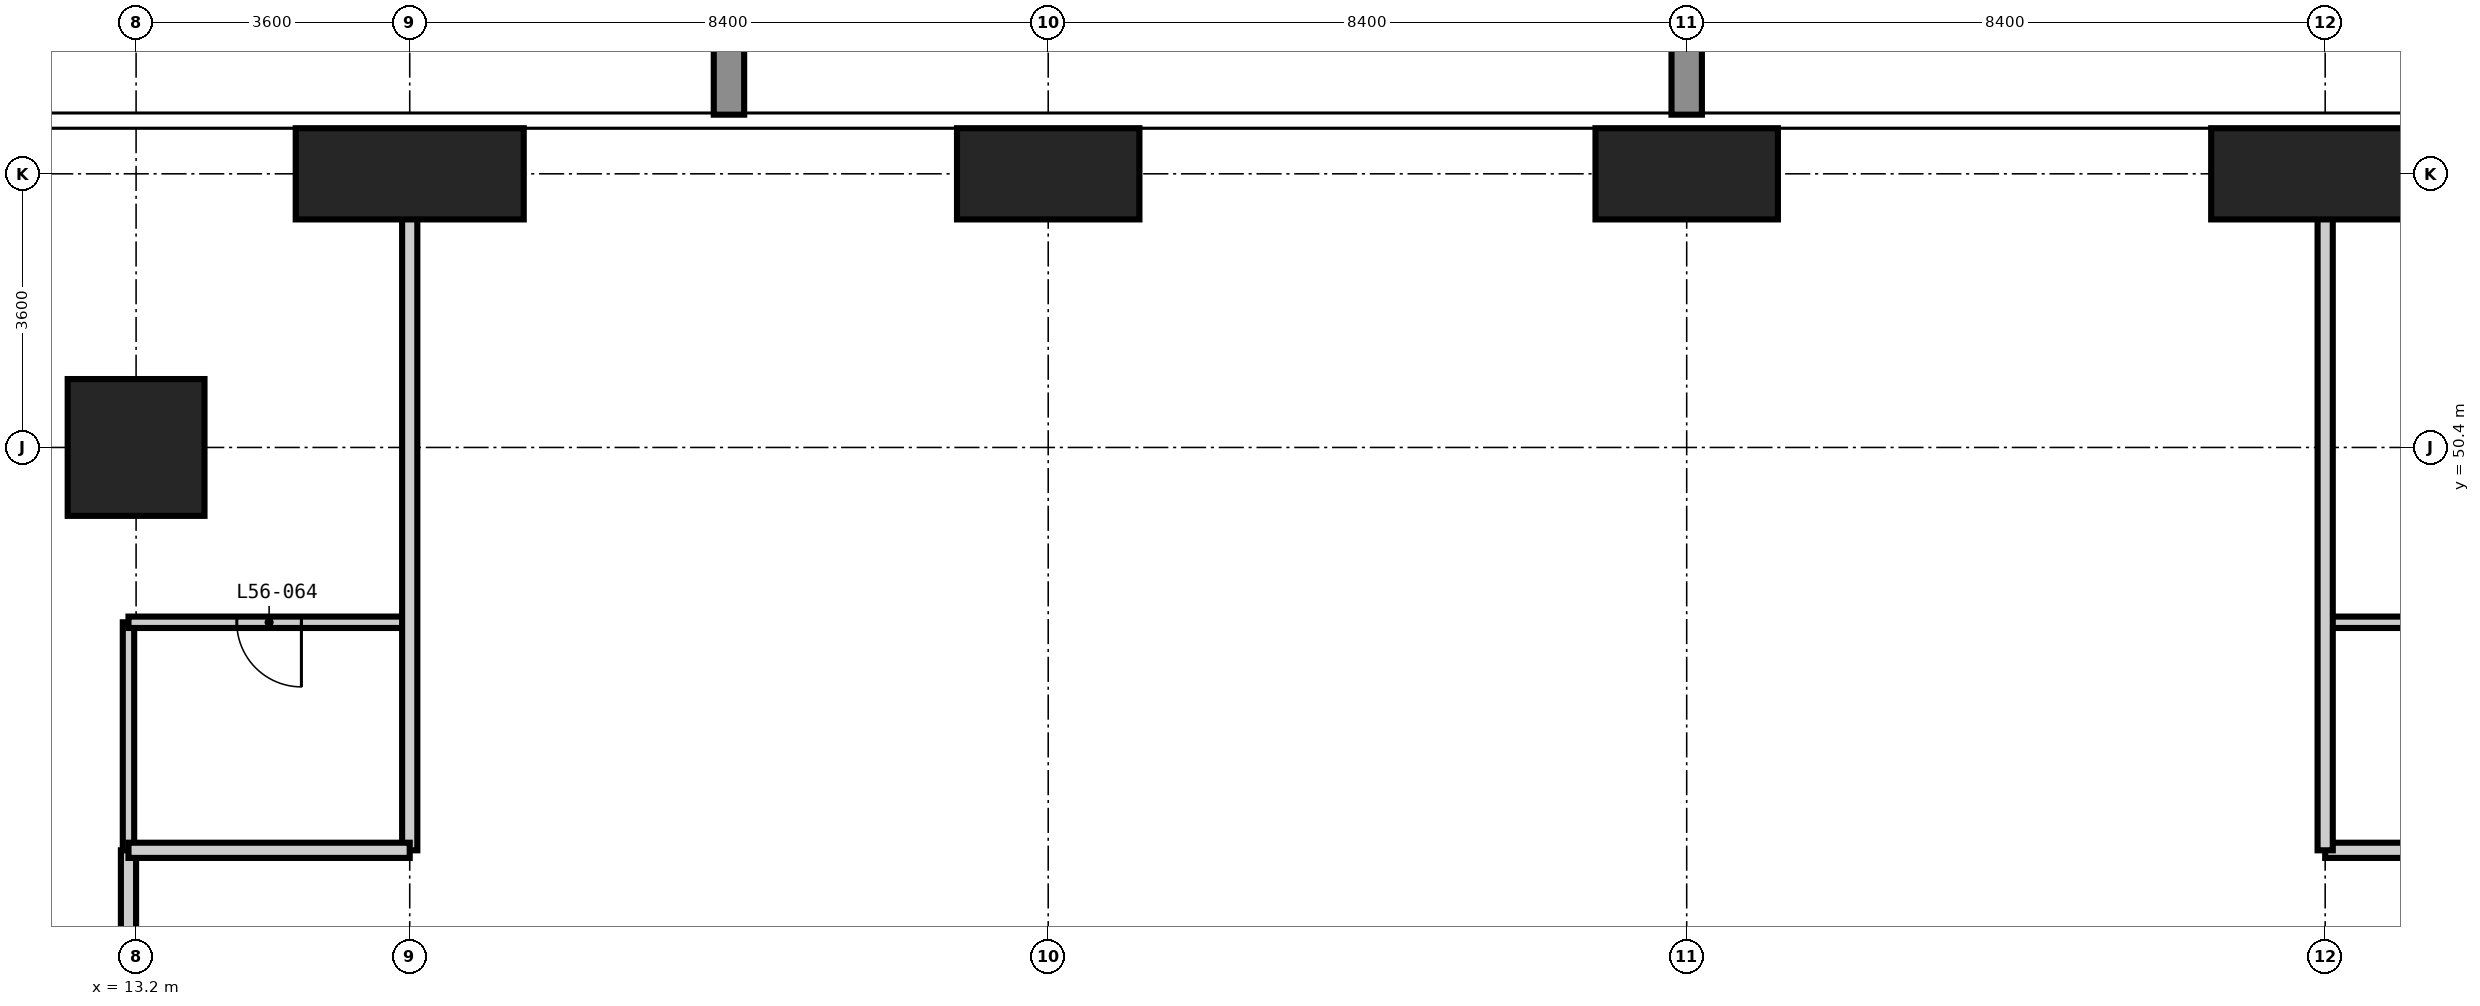
"""IFC4 building model, lengths in metres.
Left out: names, types, materials, properties, quantities, classifications, styles, units other than length and angle.
Written with IfcOpenShell. Run it as: python <this file> out.ifc"""

import sys

from ifc_helpers import new_model, si_unit, direction, frame, frame_2d, origin, origin_2d, place, context, subcontext, project, spatial, rectangle, extrude, element, fill, save


model = new_model("IFC4")
c1 = context("Model", 3, precision=1e-05, world=origin(), true_north=direction((0.0, 1.0)))
c2 = subcontext(c1, "Body", "Model", "MODEL_VIEW")
j1 = project(units=[si_unit("LENGTHUNIT", "METRE"), si_unit("PLANEANGLEUNIT", "RADIAN")], contexts=[c1])
p1 = place(None, origin())
s1 = spatial("IfcSite", under=j1, at=p1, CompositionType="ELEMENT")
p2 = place(p1, origin())
s2 = spatial("IfcBuilding", under=s1, at=p2, CompositionType="ELEMENT")
p3 = place(p2, frame((0.0, 0.0, 216.6)))
s3 = spatial("IfcBuildingStorey", under=s2, at=p3, CompositionType="ELEMENT", Elevation=216.6)
p4 = place(p3, frame((13.2, 50.4, -0.35), z_axis=(0.0, 0.0, 1.0), x_axis=(1.0, 0.0, 0.0)))
e1 = element("IfcColumn", 1, at=p4, inside=s3, PredefinedType="COLUMN", context=c2, shape_type="SweptSolid", body=[
    extrude(rectangle(XDim=1.8, YDim=1.8, at=origin_2d()), origin(), (0.0, 0.0, 1.0), 3.55),
])
p5 = place(p3, frame((16.8, 54.0, -0.35), z_axis=(0.0, 0.0, 1.0), x_axis=(1.0, 0.0, 0.0)))
e2 = element("IfcColumn", 2, at=p5, inside=s3, PredefinedType="COLUMN", context=c2, shape_type="SweptSolid", body=[
    extrude(rectangle(XDim=3.0, YDim=1.2, at=origin_2d()), origin(), (0.0, 0.0, 1.0), 3.55),
])
for number, where, z_axis, x_axis in (
    (3, (25.2, 54.0, -0.35), (0.0, 0.0, 1.0), (1.0, 0.0, 0.0)),
    (4, (33.6, 54.0, -0.35), (0.0, 0.0, 1.0), (1.0, 0.0, 0.0)),
):
    element("IfcColumn", number, at=place(p3, frame(where, z_axis=z_axis, x_axis=x_axis)), inside=s3, PredefinedType="COLUMN", context=c2, shape_type="SweptSolid", body=[
        extrude(rectangle(XDim=2.4, YDim=1.2, at=origin_2d()), origin(), (0.0, 0.0, 1.0), 3.55),
    ])
p6 = place(p3, frame((42.0, 54.0, -0.35), z_axis=(0.0, 0.0, 1.0), x_axis=(1.0, 0.0, 0.0)))
e5 = element("IfcColumn", 5, at=p6, inside=s3, PredefinedType="COLUMN", context=c2, shape_type="SweptSolid", body=[
    extrude(rectangle(XDim=3.0, YDim=1.2, at=origin_2d()), origin(), (0.0, 0.0, 1.0), 3.55),
])
p7 = place(p3, frame((13.1, 45.1, 0.0), z_axis=(0.0, 0.0, 1.0), x_axis=(0.0, 1.0, 0.0)))
e6 = element("IfcWall", 6, at=p7, inside=s3, PredefinedType="PARTITIONING", context=c2, shape_type="SweptSolid", body=[
    extrude(rectangle(XDim=3.0, YDim=0.15, at=frame_2d((1.5, 0.0))), origin(), (0.0, 0.0, 1.0), 3.2),
])
p8 = place(p3, frame((13.1, 48.1, 0.0), z_axis=(0.0, 0.0, 1.0), x_axis=(1.0, 0.0, 0.0)))
e7 = element("IfcWall", 7, at=p8, inside=s3, PredefinedType="PARTITIONING", context=c2, shape_type="SweptSolid", body=[
    extrude(rectangle(XDim=3.7, YDim=0.15, at=frame_2d((1.85, 0.0))), origin(), (0.0, 0.0, 1.0), 3.2),
])
p9 = place(p8, frame((1.425, 0.0, 0.0)))
e8 = element("IfcOpeningElement", 8, at=p9, cuts=e7, PredefinedType="OPENING", context=c2, shape_type="SweptSolid", body=[
    extrude(rectangle(XDim=0.85, YDim=2.1, at=frame_2d((0.425, 1.05))), frame((0.0, 0.085, 0.0), z_axis=(0.0, -1.0, 0.0), x_axis=(1.0, 0.0, 0.0)), (0.0, 0.0, 1.0), 0.17),
])
p10 = place(p3, frame((42.0, 48.1, 0.0), z_axis=(0.0, 0.0, 1.0), x_axis=(1.0, 0.0, 0.0)))
e9 = element("IfcWall", 9, at=p10, inside=s3, PredefinedType="PARTITIONING", context=c2, shape_type="SweptSolid", body=[
    extrude(rectangle(XDim=2.5, YDim=0.15, at=frame_2d((1.25, 0.0))), origin(), (0.0, 0.0, 1.0), 3.2),
])
p11 = place(p3, frame((13.1, 13.1, 0.0), z_axis=(0.0, 0.0, 1.0), x_axis=(0.0, 1.0, 0.0)))
e10 = element("IfcWall", 10, at=p11, inside=s3, PredefinedType="PARTITIONING", context=c2, shape_type="SweptSolid", body=[
    extrude(rectangle(XDim=32.0, YDim=0.2, at=frame_2d((16.0, 0.0))), origin(), (0.0, 0.0, 1.0), 3.2),
])
p12 = place(p11, frame((5.3, 0.0, 0.0)))
e11 = element("IfcOpeningElement", 11, at=p12, cuts=e10, PredefinedType="OPENING", context=c2, shape_type="SweptSolid", body=[
    extrude(rectangle(XDim=1.0, YDim=2.2, at=frame_2d((0.5, 1.1))), frame((0.0, 0.11, 0.0), z_axis=(0.0, -1.0, 0.0), x_axis=(1.0, 0.0, 0.0)), (0.0, 0.0, 1.0), 0.22),
])
p13 = place(p11, frame((13.1, 0.0, 0.0)))
e12 = element("IfcOpeningElement", 12, at=p13, cuts=e10, PredefinedType="OPENING", context=c2, shape_type="SweptSolid", body=[
    extrude(rectangle(XDim=1.0, YDim=2.2, at=frame_2d((0.5, 1.1))), frame((0.0, 0.11, 0.0), z_axis=(0.0, -1.0, 0.0), x_axis=(1.0, 0.0, 0.0)), (0.0, 0.0, 1.0), 0.22),
])
p14 = place(p11, frame((18.5, 0.0, 0.0)))
e13 = element("IfcOpeningElement", 13, at=p14, cuts=e10, PredefinedType="OPENING", context=c2, shape_type="SweptSolid", body=[
    extrude(rectangle(XDim=1.0, YDim=2.2, at=frame_2d((0.5, 1.1))), frame((0.0, 0.11, 0.0), z_axis=(0.0, -1.0, 0.0), x_axis=(1.0, 0.0, 0.0)), (0.0, 0.0, 1.0), 0.22),
])
p15 = place(p11, frame((26.3, 0.0, 0.0)))
e14 = element("IfcOpeningElement", 14, at=p15, cuts=e10, PredefinedType="OPENING", context=c2, shape_type="SweptSolid", body=[
    extrude(rectangle(XDim=1.0, YDim=2.2, at=frame_2d((0.5, 1.1))), frame((0.0, 0.11, 0.0), z_axis=(0.0, -1.0, 0.0), x_axis=(1.0, 0.0, 0.0)), (0.0, 0.0, 1.0), 0.22),
])
p16 = place(p11, frame((1.35, 0.0, 0.0)))
e15 = element("IfcOpeningElement", 15, at=p16, cuts=e10, PredefinedType="OPENING", context=c2, shape_type="SweptSolid", body=[
    extrude(rectangle(XDim=1.0, YDim=2.2, at=frame_2d((0.5, 1.1))), frame((0.0, 0.11, 0.0), z_axis=(0.0, -1.0, 0.0), x_axis=(1.0, 0.0, 0.0)), (0.0, 0.0, 1.0), 0.22),
])
p17 = place(p11, frame((29.95, 0.0, 0.0)))
e16 = element("IfcOpeningElement", 16, at=p17, cuts=e10, PredefinedType="OPENING", context=c2, shape_type="SweptSolid", body=[
    extrude(rectangle(XDim=1.0, YDim=2.2, at=frame_2d((0.5, 1.1))), frame((0.0, 0.11, 0.0), z_axis=(0.0, -1.0, 0.0), x_axis=(1.0, 0.0, 0.0)), (0.0, 0.0, 1.0), 0.22),
])
p18 = place(p3, frame((16.8, 45.1, 0.0), z_axis=(0.0, 0.0, 1.0), x_axis=(0.0, 1.0, 0.0)))
e17 = element("IfcWall", 17, at=p18, inside=s3, PredefinedType="PARTITIONING", context=c2, shape_type="SweptSolid", body=[
    extrude(rectangle(XDim=9.518, YDim=0.2, at=frame_2d((4.759, 0.0))), origin(), (0.0, 0.0, 1.0), 3.2),
])
p19 = place(p3, frame((13.1, 45.1, 0.0), z_axis=(0.0, 0.0, 1.0), x_axis=(1.0, 0.0, 0.0)))
e18 = element("IfcWall", 18, at=p19, inside=s3, PredefinedType="PARTITIONING", context=c2, shape_type="SweptSolid", body=[
    extrude(rectangle(XDim=3.7, YDim=0.2, at=frame_2d((1.85, 0.0))), origin(), (0.0, 0.0, 1.0), 3.2),
])
p20 = place(p3, frame((42.0, 45.1, 0.0), z_axis=(0.0, 0.0, 1.0), x_axis=(1.0, 0.0, 0.0)))
e19 = element("IfcWall", 19, at=p20, inside=s3, PredefinedType="PARTITIONING", context=c2, shape_type="SweptSolid", body=[
    extrude(rectangle(XDim=2.5, YDim=0.2, at=frame_2d((1.25, 0.0))), origin(), (0.0, 0.0, 1.0), 3.2),
])
p21 = place(p3, frame((42.0, 54.618, 0.0), z_axis=(0.0, 0.0, 1.0), x_axis=(0.0, -1.0, 0.0)))
e20 = element("IfcWall", 20, at=p21, inside=s3, PredefinedType="PARTITIONING", context=c2, shape_type="SweptSolid", body=[
    extrude(rectangle(XDim=9.518, YDim=0.2, at=frame_2d((4.759, 0.0))), origin(), (0.0, 0.0, 1.0), 3.2),
])
p22 = place(p9, frame((0.85, 0.0, 0.0), z_axis=(0.0, 0.0, 1.0), x_axis=(-1.0, 0.0, 0.0)))
e21 = element("IfcDoor", 21, at=p22, inside=s3, OperationType="SINGLE_SWING_LEFT", PredefinedType="DOOR", context=c2, shape_type="SweptSolid", body=[
    extrude(rectangle(XDim=0.85, YDim=2.1, at=frame_2d((0.425, 1.05))), frame((0.0, 0.025, 0.0), z_axis=(0.0, -1.0, 0.0), x_axis=(1.0, 0.0, 0.0)), (0.0, 0.0, 1.0), 0.05),
])
fill(e8, e21)
save(model, sys.argv[1])
